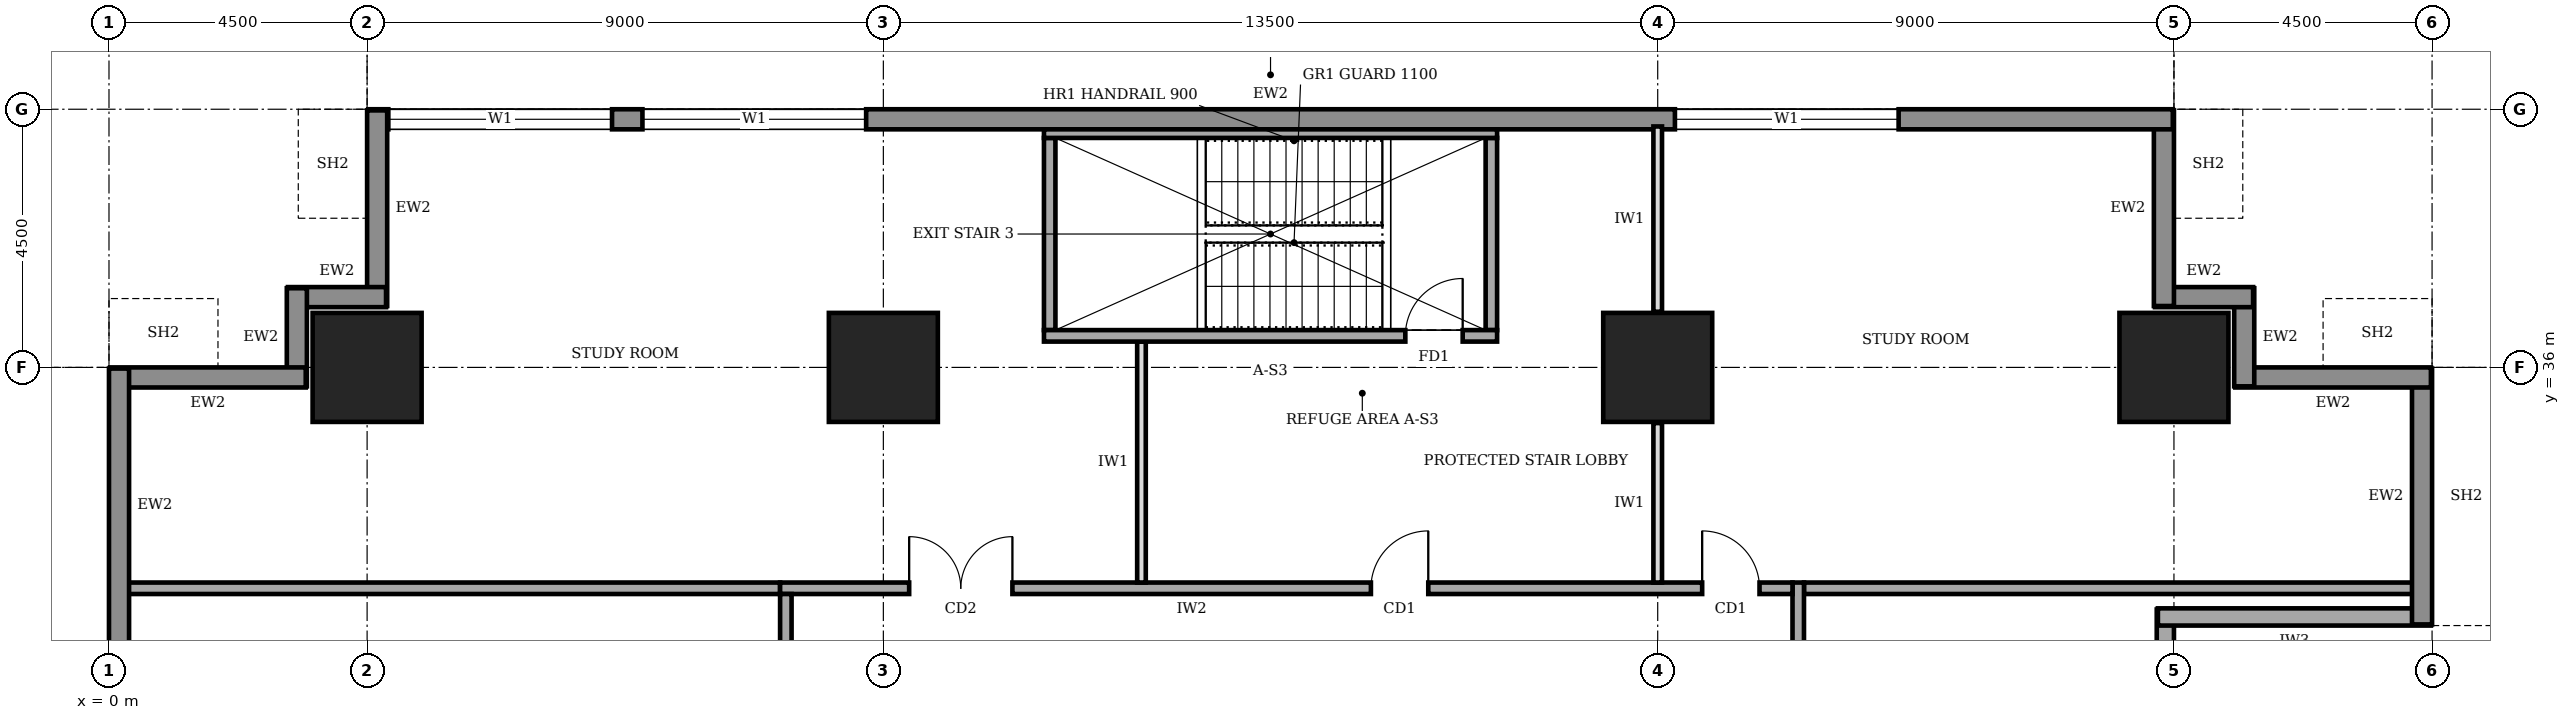
"""IFC4 building model, lengths in metres.
Left out: names, types, materials, properties, quantities, classifications, styles, units other than length and angle.
Written with IfcOpenShell. Run it as: python <this file> out.ifc"""

import sys

from ifc_helpers import new_model, si_unit, direction, frame, frame_2d, origin, origin_2d, place, context, subcontext, project, spatial, rectangle, extrude, element, fill, save


model = new_model("IFC4")
c1 = context("Model", 3, precision=1e-05, world=origin(), true_north=direction((0.0, 1.0)))
c2 = subcontext(c1, "Body", "Model", "MODEL_VIEW")
j1 = project(units=[si_unit("LENGTHUNIT", "METRE"), si_unit("PLANEANGLEUNIT", "RADIAN")], contexts=[c1])
p1 = place(None, origin())
s1 = spatial("IfcSite", under=j1, at=p1, CompositionType="ELEMENT")
p2 = place(p1, origin())
s2 = spatial("IfcBuilding", under=s1, at=p2, CompositionType="ELEMENT")
p3 = place(p2, frame((0.0, 0.0, 117.0)))
s3 = spatial("IfcBuildingStorey", under=s2, at=p3, CompositionType="ELEMENT", Elevation=117.0)
for number, where, z_axis, x_axis in (
    (1, (4.5, 36.0, 0.0), (0.0, 0.0, 1.0), (1.0, 0.0, 0.0)),
    (2, (13.5, 36.0, 0.0), (0.0, 0.0, 1.0), (1.0, 0.0, 0.0)),
    (3, (27.0, 36.0, 0.0), (0.0, 0.0, 1.0), (1.0, 0.0, 0.0)),
    (4, (36.0, 36.0, 0.0), (0.0, 0.0, 1.0), (1.0, 0.0, 0.0)),
):
    element("IfcColumn", number, at=place(p3, frame(where, z_axis=z_axis, x_axis=x_axis)), inside=s3, PredefinedType="COLUMN", context=c2, shape_type="SweptSolid", body=[
        extrude(rectangle(XDim=1.9, YDim=1.9, at=origin_2d()), origin(), (0.0, 0.0, 1.0), 4.0),
    ])
p4 = place(p3, frame((35.85, 30.4, 0.0), z_axis=(0.0, 0.0, 1.0), x_axis=(0.0, 1.0, 0.0)))
e5 = element("IfcWall", 5, at=p4, inside=s3, PredefinedType="SOLIDWALL", context=c2, shape_type="SweptSolid", body=[
    extrude(rectangle(XDim=1.38, YDim=0.3, at=frame_2d((0.69, 0.0))), origin(), (0.0, 0.0, 1.0), 2.65),
])
p5 = place(p3, frame((35.72, 31.65, 0.0), z_axis=(0.0, 0.0, 1.0), x_axis=(1.0, 0.0, 0.0)))
e6 = element("IfcWall", 6, at=p5, inside=s3, PredefinedType="SOLIDWALL", context=c2, shape_type="SweptSolid", body=[
    extrude(rectangle(XDim=4.76, YDim=0.3, at=frame_2d((2.38, 0.0))), origin(), (0.0, 0.0, 1.0), 3.75),
])
p6 = place(p3, frame((40.325, 31.52, 0.0), z_axis=(0.0, 0.0, 1.0), x_axis=(0.0, 1.0, 0.0)))
e7 = element("IfcWall", 7, at=p6, inside=s3, PredefinedType="STANDARD", context=c2, shape_type="SweptSolid", body=[
    extrude(rectangle(XDim=4.46, YDim=0.35, at=frame_2d((2.23, 0.0))), origin(), (0.0, 0.0, 1.0), 3.75),
])
p7 = place(p3, frame((40.48, 35.825, 0.0), z_axis=(0.0, 0.0, 1.0), x_axis=(-1.0, 0.0, 0.0)))
e8 = element("IfcWall", 8, at=p7, inside=s3, PredefinedType="STANDARD", context=c2, shape_type="SweptSolid", body=[
    extrude(rectangle(XDim=3.41, YDim=0.35, at=frame_2d((1.705, 0.0))), origin(), (0.0, 0.0, 1.0), 2.85),
])
for number, where, z_axis, x_axis in (
    (9, (37.225, 35.67, 0.0), (0.0, 0.0, 1.0), (0.0, 1.0, 0.0)),
    (10, (37.38, 37.225, 0.0), (0.0, 0.0, 1.0), (-1.0, 0.0, 0.0)),
):
    element("IfcWall", number, at=place(p3, frame(where, z_axis=z_axis, x_axis=x_axis)), inside=s3, PredefinedType="STANDARD", context=c2, shape_type="SweptSolid", body=[
        extrude(rectangle(XDim=1.71, YDim=0.35, at=frame_2d((0.855, 0.0))), origin(), (0.0, 0.0, 1.0), 3.75),
    ])
p8 = place(p3, frame((35.825, 37.07, 0.0), z_axis=(0.0, 0.0, 1.0), x_axis=(0.0, 1.0, 0.0)))
e11 = element("IfcWall", 11, at=p8, inside=s3, PredefinedType="STANDARD", context=c2, shape_type="SweptSolid", body=[
    extrude(rectangle(XDim=3.41, YDim=0.35, at=frame_2d((1.705, 0.0))), origin(), (0.0, 0.0, 1.0), 2.85),
])
p9 = place(p3, frame((35.98, 40.325, 0.0), z_axis=(0.0, 0.0, 1.0), x_axis=(-1.0, 0.0, 0.0)))
e12 = element("IfcWall", 12, at=p9, inside=s3, PredefinedType="STANDARD", context=c2, shape_type="SweptSolid", body=[
    extrude(rectangle(XDim=31.46, YDim=0.35, at=frame_2d((15.73, 0.0))), origin(), (0.0, 0.0, 1.0), 3.75),
])
p10 = place(p9, frame((27.21, 0.0, 0.9)))
e13 = element("IfcOpeningElement", 13, at=p10, cuts=e12, PredefinedType="OPENING", context=c2, shape_type="SweptSolid", body=[
    extrude(rectangle(XDim=3.9, YDim=2.2, at=frame_2d((1.95, 1.1))), frame((0.0, 0.185, 0.0), z_axis=(0.0, -1.0, 0.0), x_axis=(1.0, 0.0, 0.0)), (0.0, 0.0, 1.0), 0.37),
])
p11 = place(p9, frame((22.78, 0.0, 0.9)))
e14 = element("IfcOpeningElement", 14, at=p11, cuts=e12, PredefinedType="OPENING", context=c2, shape_type="SweptSolid", body=[
    extrude(rectangle(XDim=3.9, YDim=2.2, at=frame_2d((1.95, 1.1))), frame((0.0, 0.185, 0.0), z_axis=(0.0, -1.0, 0.0), x_axis=(1.0, 0.0, 0.0)), (0.0, 0.0, 1.0), 0.37),
])
p12 = place(p9, frame((4.78, 0.0, 0.9)))
e15 = element("IfcOpeningElement", 15, at=p12, cuts=e12, PredefinedType="OPENING", context=c2, shape_type="SweptSolid", body=[
    extrude(rectangle(XDim=3.9, YDim=2.2, at=frame_2d((1.95, 1.1))), frame((0.0, 0.185, 0.0), z_axis=(0.0, -1.0, 0.0), x_axis=(1.0, 0.0, 0.0)), (0.0, 0.0, 1.0), 0.37),
])
p13 = place(p3, frame((4.675, 40.48, 0.0), z_axis=(0.0, 0.0, 1.0), x_axis=(0.0, -1.0, 0.0)))
e16 = element("IfcWall", 16, at=p13, inside=s3, PredefinedType="STANDARD", context=c2, shape_type="SweptSolid", body=[
    extrude(rectangle(XDim=3.41, YDim=0.35, at=frame_2d((1.705, 0.0))), origin(), (0.0, 0.0, 1.0), 2.85),
])
for number, where, z_axis, x_axis in (
    (17, (4.83, 37.225, 0.0), (0.0, 0.0, 1.0), (-1.0, 0.0, 0.0)),
    (18, (3.275, 37.38, 0.0), (0.0, 0.0, 1.0), (0.0, -1.0, 0.0)),
):
    element("IfcWall", number, at=place(p3, frame(where, z_axis=z_axis, x_axis=x_axis)), inside=s3, PredefinedType="STANDARD", context=c2, shape_type="SweptSolid", body=[
        extrude(rectangle(XDim=1.71, YDim=0.35, at=frame_2d((0.855, 0.0))), origin(), (0.0, 0.0, 1.0), 3.75),
    ])
p14 = place(p3, frame((3.43, 35.825, 0.0), z_axis=(0.0, 0.0, 1.0), x_axis=(-1.0, 0.0, 0.0)))
e19 = element("IfcWall", 19, at=p14, inside=s3, PredefinedType="STANDARD", context=c2, shape_type="SweptSolid", body=[
    extrude(rectangle(XDim=3.41, YDim=0.35, at=frame_2d((1.705, 0.0))), origin(), (0.0, 0.0, 1.0), 2.85),
])
p15 = place(p3, frame((0.175, 35.98, 0.0), z_axis=(0.0, 0.0, 1.0), x_axis=(0.0, -1.0, 0.0)))
e20 = element("IfcWall", 20, at=p15, inside=s3, PredefinedType="STANDARD", context=c2, shape_type="SweptSolid", body=[
    extrude(rectangle(XDim=31.46, YDim=0.35, at=frame_2d((15.73, 0.0))), origin(), (0.0, 0.0, 1.0), 3.75),
])
p16 = place(p15, frame((27.21, 0.0, 0.9)))
e21 = element("IfcOpeningElement", 21, at=p16, cuts=e20, PredefinedType="OPENING", context=c2, shape_type="SweptSolid", body=[
    extrude(rectangle(XDim=3.9, YDim=2.2, at=frame_2d((1.95, 1.1))), frame((0.0, 0.185, 0.0), z_axis=(0.0, -1.0, 0.0), x_axis=(1.0, 0.0, 0.0)), (0.0, 0.0, 1.0), 0.37),
])
p17 = place(p15, frame((22.78, 0.0, 0.9)))
e22 = element("IfcOpeningElement", 22, at=p17, cuts=e20, PredefinedType="OPENING", context=c2, shape_type="SweptSolid", body=[
    extrude(rectangle(XDim=3.9, YDim=2.2, at=frame_2d((1.95, 1.1))), frame((0.0, 0.185, 0.0), z_axis=(0.0, -1.0, 0.0), x_axis=(1.0, 0.0, 0.0)), (0.0, 0.0, 1.0), 0.37),
])
p18 = place(p15, frame((18.28, 0.0, 0.9)))
e23 = element("IfcOpeningElement", 23, at=p18, cuts=e20, PredefinedType="OPENING", context=c2, shape_type="SweptSolid", body=[
    extrude(rectangle(XDim=3.9, YDim=2.2, at=frame_2d((1.95, 1.1))), frame((0.0, 0.185, 0.0), z_axis=(0.0, -1.0, 0.0), x_axis=(1.0, 0.0, 0.0)), (0.0, 0.0, 1.0), 0.37),
])
p19 = place(p15, frame((13.78, 0.0, 0.9)))
e24 = element("IfcOpeningElement", 24, at=p19, cuts=e20, PredefinedType="OPENING", context=c2, shape_type="SweptSolid", body=[
    extrude(rectangle(XDim=3.9, YDim=2.2, at=frame_2d((1.95, 1.1))), frame((0.0, 0.185, 0.0), z_axis=(0.0, -1.0, 0.0), x_axis=(1.0, 0.0, 0.0)), (0.0, 0.0, 1.0), 0.37),
])
p20 = place(p15, frame((9.28, 0.0, 0.9)))
e25 = element("IfcOpeningElement", 25, at=p20, cuts=e20, PredefinedType="OPENING", context=c2, shape_type="SweptSolid", body=[
    extrude(rectangle(XDim=3.9, YDim=2.2, at=frame_2d((1.95, 1.1))), frame((0.0, 0.185, 0.0), z_axis=(0.0, -1.0, 0.0), x_axis=(1.0, 0.0, 0.0)), (0.0, 0.0, 1.0), 0.37),
])
p21 = place(p15, frame((4.78, 0.0, 0.9)))
e26 = element("IfcOpeningElement", 26, at=p21, cuts=e20, PredefinedType="OPENING", context=c2, shape_type="SweptSolid", body=[
    extrude(rectangle(XDim=3.9, YDim=2.2, at=frame_2d((1.95, 1.1))), frame((0.0, 0.185, 0.0), z_axis=(0.0, -1.0, 0.0), x_axis=(1.0, 0.0, 0.0)), (0.0, 0.0, 1.0), 0.37),
])
p22 = place(p3, frame((29.45, 9.2, 0.0), z_axis=(0.0, 0.0, 1.0), x_axis=(0.0, 1.0, 0.0)))
e27 = element("IfcWall", 27, at=p22, inside=s3, PredefinedType="SOLIDWALL", context=c2, shape_type="SweptSolid", body=[
    extrude(rectangle(XDim=23.05, YDim=0.2, at=frame_2d((11.525, 0.0))), origin(), (0.0, 0.0, 1.0), 3.75),
])
p23 = place(p22, frame((10.525, 0.0, 0.0)))
e28 = element("IfcOpeningElement", 28, at=p23, cuts=e27, PredefinedType="OPENING", context=c2, shape_type="SweptSolid", body=[
    extrude(rectangle(XDim=1.8, YDim=2.1, at=frame_2d((0.9, 1.05))), frame((0.0, 0.11, 0.0), z_axis=(0.0, -1.0, 0.0), x_axis=(1.0, 0.0, 0.0)), (0.0, 0.0, 1.0), 0.22),
])
p24 = place(p3, frame((29.35, 32.15, 0.0), z_axis=(0.0, 0.0, 1.0), x_axis=(-1.0, 0.0, 0.0)))
e29 = element("IfcWall", 29, at=p24, inside=s3, PredefinedType="SOLIDWALL", context=c2, shape_type="SweptSolid", body=[
    extrude(rectangle(XDim=17.65, YDim=0.2, at=frame_2d((8.825, 0.0))), origin(), (0.0, 0.0, 1.0), 3.75),
])
p25 = place(p24, frame((13.6, 0.0, 0.0)))
e30 = element("IfcOpeningElement", 30, at=p25, cuts=e29, PredefinedType="OPENING", context=c2, shape_type="SweptSolid", body=[
    extrude(rectangle(XDim=1.8, YDim=2.1, at=frame_2d((0.9, 1.05))), frame((0.0, 0.11, 0.0), z_axis=(0.0, -1.0, 0.0), x_axis=(1.0, 0.0, 0.0)), (0.0, 0.0, 1.0), 0.22),
])
p26 = place(p24, frame((6.35, 0.0, 0.0)))
e31 = element("IfcOpeningElement", 31, at=p26, cuts=e29, PredefinedType="OPENING", context=c2, shape_type="SweptSolid", body=[
    extrude(rectangle(XDim=1.0, YDim=2.1, at=frame_2d((0.5, 1.05))), frame((0.0, 0.11, 0.0), z_axis=(0.0, -1.0, 0.0), x_axis=(1.0, 0.0, 0.0)), (0.0, 0.0, 1.0), 0.22),
])
p27 = place(p24, frame((0.575, 0.0, 0.0)))
e32 = element("IfcOpeningElement", 32, at=p27, cuts=e29, PredefinedType="OPENING", context=c2, shape_type="SweptSolid", body=[
    extrude(rectangle(XDim=1.0, YDim=2.1, at=frame_2d((0.5, 1.05))), frame((0.0, 0.11, 0.0), z_axis=(0.0, -1.0, 0.0), x_axis=(1.0, 0.0, 0.0)), (0.0, 0.0, 1.0), 0.22),
])
p28 = place(p3, frame((11.8, 32.05, 0.0), z_axis=(0.0, 0.0, 1.0), x_axis=(0.0, -1.0, 0.0)))
e33 = element("IfcWall", 33, at=p28, inside=s3, PredefinedType="SOLIDWALL", context=c2, shape_type="SweptSolid", body=[
    extrude(rectangle(XDim=23.05, YDim=0.2, at=frame_2d((11.525, 0.0))), origin(), (0.0, 0.0, 1.0), 3.75),
])
p29 = place(p28, frame((20.3, 0.0, 0.0)))
e34 = element("IfcOpeningElement", 34, at=p29, cuts=e33, PredefinedType="OPENING", context=c2, shape_type="SweptSolid", body=[
    extrude(rectangle(XDim=1.0, YDim=2.1, at=frame_2d((0.5, 1.05))), frame((0.0, 0.11, 0.0), z_axis=(0.0, -1.0, 0.0), x_axis=(1.0, 0.0, 0.0)), (0.0, 0.0, 1.0), 0.22),
])
p30 = place(p28, frame((16.4, 0.0, 0.0)))
e35 = element("IfcOpeningElement", 35, at=p30, cuts=e33, PredefinedType="OPENING", context=c2, shape_type="SweptSolid", body=[
    extrude(rectangle(XDim=0.9, YDim=2.1, at=frame_2d((0.45, 1.05))), frame((0.0, 0.11, 0.0), z_axis=(0.0, -1.0, 0.0), x_axis=(1.0, 0.0, 0.0)), (0.0, 0.0, 1.0), 0.22),
])
p31 = place(p28, frame((11.6, 0.0, 0.0)))
e36 = element("IfcOpeningElement", 36, at=p31, cuts=e33, PredefinedType="OPENING", context=c2, shape_type="SweptSolid", body=[
    extrude(rectangle(XDim=0.9, YDim=2.1, at=frame_2d((0.45, 1.05))), frame((0.0, 0.11, 0.0), z_axis=(0.0, -1.0, 0.0), x_axis=(1.0, 0.0, 0.0)), (0.0, 0.0, 1.0), 0.22),
])
p32 = place(p28, frame((8.55, 0.0, 0.0)))
e37 = element("IfcOpeningElement", 37, at=p32, cuts=e33, PredefinedType="OPENING", context=c2, shape_type="SweptSolid", body=[
    extrude(rectangle(XDim=0.9, YDim=2.1, at=frame_2d((0.45, 1.05))), frame((0.0, 0.11, 0.0), z_axis=(0.0, -1.0, 0.0), x_axis=(1.0, 0.0, 0.0)), (0.0, 0.0, 1.0), 0.22),
])
p33 = place(p28, frame((5.55, 0.0, 0.0)))
e38 = element("IfcOpeningElement", 38, at=p33, cuts=e33, PredefinedType="OPENING", context=c2, shape_type="SweptSolid", body=[
    extrude(rectangle(XDim=1.0, YDim=2.1, at=frame_2d((0.5, 1.05))), frame((0.0, 0.11, 0.0), z_axis=(0.0, -1.0, 0.0), x_axis=(1.0, 0.0, 0.0)), (0.0, 0.0, 1.0), 0.22),
])
p34 = place(p28, frame((13.65, 0.0, 0.0)))
e39 = element("IfcOpeningElement", 39, at=p34, cuts=e33, PredefinedType="OPENING", context=c2, shape_type="SweptSolid", body=[
    extrude(rectangle(XDim=1.0, YDim=2.1, at=frame_2d((0.5, 1.05))), frame((0.0, 0.11, 0.0), z_axis=(0.0, -1.0, 0.0), x_axis=(1.0, 0.0, 0.0)), (0.0, 0.0, 1.0), 0.22),
])
p35 = place(p28, frame((1.925, 0.0, 0.0)))
e40 = element("IfcOpeningElement", 40, at=p35, cuts=e33, PredefinedType="OPENING", context=c2, shape_type="SweptSolid", body=[
    extrude(rectangle(XDim=1.0, YDim=2.1, at=frame_2d((0.5, 1.05))), frame((0.0, 0.11, 0.0), z_axis=(0.0, -1.0, 0.0), x_axis=(1.0, 0.0, 0.0)), (0.0, 0.0, 1.0), 0.22),
])
p36 = place(p3, frame((0.3, 32.15, 0.0), z_axis=(0.0, 0.0, 1.0), x_axis=(1.0, 0.0, 0.0)))
e41 = element("IfcWall", 41, at=p36, inside=s3, PredefinedType="SOLIDWALL", context=c2, shape_type="SweptSolid", body=[
    extrude(rectangle(XDim=11.4, YDim=0.2, at=frame_2d((5.7, 0.0))), origin(), (0.0, 0.0, 1.0), 3.75),
])
p37 = place(p3, frame((29.55, 32.15, 0.0), z_axis=(0.0, 0.0, 1.0), x_axis=(1.0, 0.0, 0.0)))
e42 = element("IfcWall", 42, at=p37, inside=s3, PredefinedType="SOLIDWALL", context=c2, shape_type="SweptSolid", body=[
    extrude(rectangle(XDim=10.65, YDim=0.2, at=frame_2d((5.325, 0.0))), origin(), (0.0, 0.0, 1.0), 3.75),
])
p38 = place(p3, frame((18.0, 32.25, 0.0), z_axis=(0.0, 0.0, 1.0), x_axis=(0.0, 1.0, 0.0)))
e43 = element("IfcWall", 43, at=p38, inside=s3, PredefinedType="PARTITIONING", context=c2, shape_type="SweptSolid", body=[
    extrude(rectangle(XDim=4.2, YDim=0.15, at=frame_2d((2.1, 0.0))), origin(), (0.0, 0.0, 1.0), 3.75),
])
p39 = place(p3, frame((27.0, 32.25, 0.0), z_axis=(0.0, 0.0, 1.0), x_axis=(0.0, 1.0, 0.0)))
e44 = element("IfcWall", 44, at=p39, inside=s3, PredefinedType="PARTITIONING", context=c2, shape_type="SweptSolid", body=[
    extrude(rectangle(XDim=2.78, YDim=0.15, at=frame_2d((1.39, 0.0))), origin(), (0.0, 0.0, 1.0), 2.85),
])
p40 = place(p3, frame((27.0, 36.97, 0.0), z_axis=(0.0, 0.0, 1.0), x_axis=(0.0, 1.0, 0.0)))
e45 = element("IfcWall", 45, at=p40, inside=s3, PredefinedType="PARTITIONING", context=c2, shape_type="SweptSolid", body=[
    extrude(rectangle(XDim=3.23, YDim=0.15, at=frame_2d((1.615, 0.0))), origin(), (0.0, 0.0, 1.0), 2.85),
])
p41 = place(p3, frame((16.3, 36.55, 0.0), z_axis=(0.0, 0.0, 1.0), x_axis=(1.0, 0.0, 0.0)))
e46 = element("IfcWall", 46, at=p41, inside=s3, PredefinedType="SOLIDWALL", context=c2, shape_type="SweptSolid", body=[
    extrude(rectangle(XDim=7.9, YDim=0.2, at=frame_2d((3.95, 0.0))), origin(), (0.0, 0.0, 1.0), 3.75),
])
p42 = place(p41, frame((6.3, 0.0, 0.0)))
e47 = element("IfcOpeningElement", 47, at=p42, cuts=e46, PredefinedType="OPENING", context=c2, shape_type="SweptSolid", body=[
    extrude(rectangle(XDim=1.0, YDim=2.1, at=frame_2d((0.5, 1.05))), frame((0.0, 0.11, 0.0), z_axis=(0.0, -1.0, 0.0), x_axis=(1.0, 0.0, 0.0)), (0.0, 0.0, 1.0), 0.22),
])
p43 = place(p3, frame((16.3, 40.075, 0.0), z_axis=(0.0, 0.0, 1.0), x_axis=(1.0, 0.0, 0.0)))
e48 = element("IfcWall", 48, at=p43, inside=s3, PredefinedType="SOLIDWALL", context=c2, shape_type="SweptSolid", body=[
    extrude(rectangle(XDim=7.9, YDim=0.15, at=frame_2d((3.95, 0.0))), origin(), (0.0, 0.0, 1.0), 3.75),
])
for number, where, z_axis, x_axis in (
    (49, (16.4, 36.65, 0.0), (0.0, 0.0, 1.0), (0.0, 1.0, 0.0)),
    (50, (24.1, 36.65, 0.0), (0.0, 0.0, 1.0), (0.0, 1.0, 0.0)),
):
    element("IfcWall", number, at=place(p3, frame(where, z_axis=z_axis, x_axis=x_axis)), inside=s3, PredefinedType="SOLIDWALL", context=c2, shape_type="SweptSolid", body=[
        extrude(rectangle(XDim=3.35, YDim=0.2, at=frame_2d((1.675, 0.0))), origin(), (0.0, 0.0, 1.0), 3.75),
    ])
p44 = place(p10, origin())
e51 = element("IfcWindow", 51, at=p44, inside=s3, PartitioningType="SINGLE_PANEL", PredefinedType="WINDOW", context=c2, shape_type="SweptSolid", body=[
    extrude(rectangle(XDim=3.9, YDim=2.2, at=frame_2d((1.95, 1.1))), frame((0.0, 0.03, 0.0), z_axis=(0.0, -1.0, 0.0), x_axis=(1.0, 0.0, 0.0)), (0.0, 0.0, 1.0), 0.06),
])
fill(e13, e51)
p45 = place(p11, origin())
e52 = element("IfcWindow", 52, at=p45, inside=s3, PartitioningType="SINGLE_PANEL", PredefinedType="WINDOW", context=c2, shape_type="SweptSolid", body=[
    extrude(rectangle(XDim=3.9, YDim=2.2, at=frame_2d((1.95, 1.1))), frame((0.0, 0.03, 0.0), z_axis=(0.0, -1.0, 0.0), x_axis=(1.0, 0.0, 0.0)), (0.0, 0.0, 1.0), 0.06),
])
fill(e14, e52)
p46 = place(p12, origin())
e53 = element("IfcWindow", 53, at=p46, inside=s3, PartitioningType="SINGLE_PANEL", PredefinedType="WINDOW", context=c2, shape_type="SweptSolid", body=[
    extrude(rectangle(XDim=3.9, YDim=2.2, at=frame_2d((1.95, 1.1))), frame((0.0, 0.03, 0.0), z_axis=(0.0, -1.0, 0.0), x_axis=(1.0, 0.0, 0.0)), (0.0, 0.0, 1.0), 0.06),
])
fill(e15, e53)
p47 = place(p25, frame((1.8, 0.0, 0.0), z_axis=(0.0, 0.0, 1.0), x_axis=(-1.0, 0.0, 0.0)))
e54 = element("IfcDoor", 54, at=p47, inside=s3, OperationType="DOUBLE_DOOR_SINGLE_SWING", PredefinedType="DOOR", context=c2, shape_type="SweptSolid", body=[
    extrude(rectangle(XDim=1.8, YDim=2.1, at=frame_2d((0.9, 1.05))), frame((0.0, 0.025, 0.0), z_axis=(0.0, -1.0, 0.0), x_axis=(1.0, 0.0, 0.0)), (0.0, 0.0, 1.0), 0.05),
])
fill(e30, e54)
p48 = place(p26, frame((1.0, 0.0, 0.0), z_axis=(0.0, 0.0, 1.0), x_axis=(-1.0, 0.0, 0.0)))
e55 = element("IfcDoor", 55, at=p48, inside=s3, OperationType="SINGLE_SWING_RIGHT", PredefinedType="DOOR", context=c2, shape_type="SweptSolid", body=[
    extrude(rectangle(XDim=1.0, YDim=2.1, at=frame_2d((0.5, 1.05))), frame((0.0, 0.025, 0.0), z_axis=(0.0, -1.0, 0.0), x_axis=(1.0, 0.0, 0.0)), (0.0, 0.0, 1.0), 0.05),
])
fill(e31, e55)
p49 = place(p27, frame((1.0, 0.0, 0.0), z_axis=(0.0, 0.0, 1.0), x_axis=(-1.0, 0.0, 0.0)))
e56 = element("IfcDoor", 56, at=p49, inside=s3, OperationType="SINGLE_SWING_LEFT", PredefinedType="DOOR", context=c2, shape_type="SweptSolid", body=[
    extrude(rectangle(XDim=1.0, YDim=2.1, at=frame_2d((0.5, 1.05))), frame((0.0, 0.025, 0.0), z_axis=(0.0, -1.0, 0.0), x_axis=(1.0, 0.0, 0.0)), (0.0, 0.0, 1.0), 0.05),
])
fill(e32, e56)
p50 = place(p42, origin())
e57 = element("IfcDoor", 57, at=p50, inside=s3, OperationType="SINGLE_SWING_RIGHT", PredefinedType="DOOR", context=c2, shape_type="SweptSolid", body=[
    extrude(rectangle(XDim=1.0, YDim=2.1, at=frame_2d((0.5, 1.05))), frame((0.0, 0.025, 0.0), z_axis=(0.0, -1.0, 0.0), x_axis=(1.0, 0.0, 0.0)), (0.0, 0.0, 1.0), 0.05),
])
fill(e47, e57)
save(model, sys.argv[1])
